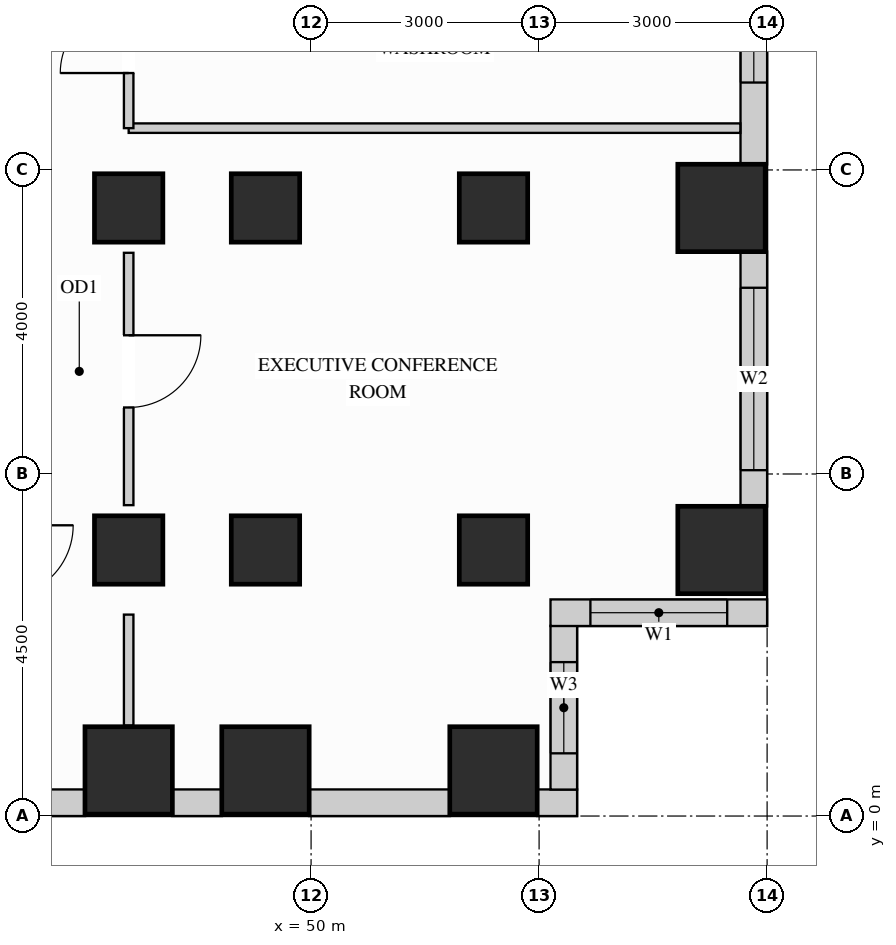
"""IFC4 building model, lengths in metres.
Left out: names, types, materials, properties, quantities, classifications, styles, units other than length and angle.
Written with IfcOpenShell. Run it as: python <this file> out.ifc"""

import sys

from ifc_helpers import new_model, si_unit, direction, frame, frame_2d, origin, origin_2d, place, context, subcontext, project, spatial, rectangle, extrude, source, transform, mapped, element, fill, save


model = new_model("IFC4")
c1 = context("Model", 3, precision=1e-05, world=origin(), true_north=direction((0.0, 1.0)))
c2 = subcontext(c1, "Body", "Model", "MODEL_VIEW")
j1 = project(units=[si_unit("LENGTHUNIT", "METRE"), si_unit("PLANEANGLEUNIT", "RADIAN")], contexts=[c1])
p1 = place(None, origin())
s1 = spatial("IfcSite", under=j1, at=p1, CompositionType="ELEMENT")
p2 = place(p1, origin())
s2 = spatial("IfcBuilding", under=s1, at=p2, CompositionType="ELEMENT")
p3 = place(p2, frame((0.0, 0.0, 124.2)))
s3 = spatial("IfcBuildingStorey", under=s2, at=p3, CompositionType="ELEMENT", Elevation=124.2)
m1 = source(origin(), c2, "Body", "SweptSolid", [
    extrude(rectangle(XDim=0.9, YDim=0.9, at=origin_2d()), origin(), (0.0, 0.0, 1.0), 3.38),
])
for number, where, z_axis, x_axis in (
    (1, (47.6, 3.5, 0.0), (0.0, 0.0, 1.0), (1.0, 0.0, 0.0)),
    (2, (47.6, 8.0, 0.0), (0.0, 0.0, 1.0), (1.0, 0.0, 0.0)),
    (3, (49.4, 3.5, 0.0), (0.0, 0.0, 1.0), (1.0, 0.0, 0.0)),
    (4, (49.4, 8.0, 0.0), (0.0, 0.0, 1.0), (1.0, 0.0, 0.0)),
    (5, (52.4, 3.5, 0.0), (0.0, 0.0, 1.0), (1.0, 0.0, 0.0)),
    (6, (52.4, 8.0, 0.0), (0.0, 0.0, 1.0), (1.0, 0.0, 0.0)),
):
    element("IfcColumn", number, at=place(p3, frame(where, z_axis=z_axis, x_axis=x_axis)), inside=s3, PredefinedType="COLUMN", context=c2, shape_type="MappedRepresentation", body=[
        mapped(m1, transform((0.0, 0.0, 0.0), x_axis=(1.0, 0.0, 0.0), y_axis=(0.0, 1.0, 0.0), z_axis=(0.0, 0.0, 1.0))),
    ])
m2 = source(origin(), c2, "Body", "SweptSolid", [
    extrude(rectangle(XDim=1.15, YDim=1.15, at=origin_2d()), origin(), (0.0, 0.0, 1.0), 3.38),
])
for number, where, z_axis, x_axis in (
    (7, (55.4, 3.5, 0.0), (0.0, 0.0, 1.0), (1.0, 0.0, 0.0)),
    (8, (55.4, 8.0, 0.0), (0.0, 0.0, 1.0), (1.0, 0.0, 0.0)),
    (9, (47.6, 0.6, 0.0), (0.0, 0.0, 1.0), (1.0, 0.0, 0.0)),
    (10, (49.4, 0.6, 0.0), (0.0, 0.0, 1.0), (1.0, 0.0, 0.0)),
    (11, (52.4, 0.6, 0.0), (0.0, 0.0, 1.0), (1.0, 0.0, 0.0)),
):
    element("IfcColumn", number, at=place(p3, frame(where, z_axis=z_axis, x_axis=x_axis)), inside=s3, PredefinedType="COLUMN", context=c2, shape_type="MappedRepresentation", body=[
        mapped(m2, transform((0.0, 0.0, 0.0), x_axis=(1.0, 0.0, 0.0), y_axis=(0.0, 1.0, 0.0), z_axis=(0.0, 0.0, 1.0))),
    ])
p4 = place(p3, frame((40.573, 0.175, 0.0), z_axis=(0.0, 0.0, 1.0), x_axis=(1.0, 0.0, 0.0)))
e12 = element("IfcWall", 12, at=p4, inside=s3, PredefinedType="SOLIDWALL", context=c2, shape_type="SweptSolid", body=[
    extrude(rectangle(XDim=6.454, YDim=0.35, at=frame_2d((3.227, 0.0))), origin(), (0.0, 0.0, 1.0), 3.365),
])
p5 = place(p4, frame((0.712, 0.0, 0.78)))
e13 = element("IfcOpeningElement", 13, at=p5, cuts=e12, PredefinedType="OPENING", context=c2, shape_type="SweptSolid", body=[
    extrude(rectangle(XDim=1.8, YDim=2.1, at=frame_2d((0.9, 1.05))), frame((0.0, 0.185, 0.0), z_axis=(0.0, -1.0, 0.0), x_axis=(1.0, 0.0, 0.0)), (0.0, 0.0, 1.0), 0.37),
])
p6 = place(p4, frame((2.905, 0.0, 0.78)))
e14 = element("IfcOpeningElement", 14, at=p6, cuts=e12, PredefinedType="OPENING", context=c2, shape_type="SweptSolid", body=[
    extrude(rectangle(XDim=1.8, YDim=2.1, at=frame_2d((0.9, 1.05))), frame((0.0, 0.185, 0.0), z_axis=(0.0, -1.0, 0.0), x_axis=(1.0, 0.0, 0.0)), (0.0, 0.0, 1.0), 0.37),
])
m3 = source(origin(), c2, "Body", "SweptSolid", [
    extrude(rectangle(XDim=0.654, YDim=0.35, at=frame_2d((0.327, 0.0))), origin(), (0.0, 0.0, 1.0), 3.365),
])
p7 = place(p3, frame((48.173, 0.175, 0.0), z_axis=(0.0, 0.0, 1.0), x_axis=(1.0, 0.0, 0.0)))
e15 = element("IfcWall", 15, at=p7, inside=s3, PredefinedType="SOLIDWALL", context=c2, shape_type="MappedRepresentation", body=[
    mapped(m3, transform((0.0, 0.0, 0.0), x_axis=(1.0, 0.0, 0.0), y_axis=(0.0, 1.0, 0.0), z_axis=(0.0, 0.0, 1.0))),
])
m4 = source(origin(), c2, "Body", "SweptSolid", [
    extrude(rectangle(XDim=1.854, YDim=0.35, at=frame_2d((0.927, 0.0))), origin(), (0.0, 0.0, 1.0), 3.365),
])
p8 = place(p3, frame((49.973, 0.175, 0.0), z_axis=(0.0, 0.0, 1.0), x_axis=(1.0, 0.0, 0.0)))
e16 = element("IfcWall", 16, at=p8, inside=s3, PredefinedType="SOLIDWALL", context=c2, shape_type="MappedRepresentation", body=[
    mapped(m4, transform((0.0, 0.0, 0.0), x_axis=(1.0, 0.0, 0.0), y_axis=(0.0, 1.0, 0.0), z_axis=(0.0, 0.0, 1.0))),
])
m5 = source(origin(), c2, "Body", "SweptSolid", [
    extrude(rectangle(XDim=0.527, YDim=0.35, at=frame_2d((0.264, 0.0))), origin(), (0.0, 0.0, 1.0), 3.365),
])
p9 = place(p3, frame((52.973, 0.175, 0.0), z_axis=(0.0, 0.0, 1.0), x_axis=(1.0, 0.0, 0.0)))
e17 = element("IfcWall", 17, at=p9, inside=s3, PredefinedType="SOLIDWALL", context=c2, shape_type="MappedRepresentation", body=[
    mapped(m5, transform((0.0, 0.0, 0.0), x_axis=(1.0, 0.0, 0.0), y_axis=(0.0, 1.0, 0.0), z_axis=(0.0, 0.0, 1.0))),
])
p10 = place(p3, frame((53.325, 0.348, 0.0), z_axis=(0.0, 0.0, 1.0), x_axis=(0.0, 1.0, 0.0)))
e18 = element("IfcWall", 18, at=p10, inside=s3, PredefinedType="SOLIDWALL", context=c2, shape_type="SweptSolid", body=[
    extrude(rectangle(XDim=2.154, YDim=0.35, at=frame_2d((1.077, 0.0))), origin(), (0.0, 0.0, 1.0), 3.365),
])
p11 = place(p10, frame((0.477, 0.0, 0.78)))
e19 = element("IfcOpeningElement", 19, at=p11, cuts=e18, PredefinedType="OPENING", context=c2, shape_type="SweptSolid", body=[
    extrude(rectangle(XDim=1.2, YDim=2.1, at=frame_2d((0.6, 1.05))), frame((0.0, 0.185, 0.0), z_axis=(0.0, -1.0, 0.0), x_axis=(1.0, 0.0, 0.0)), (0.0, 0.0, 1.0), 0.37),
])
p12 = place(p3, frame((53.15, 2.675, 0.0), z_axis=(0.0, 0.0, 1.0), x_axis=(1.0, 0.0, 0.0)))
e20 = element("IfcWall", 20, at=p12, inside=s3, PredefinedType="SOLIDWALL", context=c2, shape_type="SweptSolid", body=[
    extrude(rectangle(XDim=2.85, YDim=0.35, at=frame_2d((1.425, 0.0))), origin(), (0.0, 0.0, 1.0), 3.365),
])
p13 = place(p12, frame((0.525, 0.0, 0.78)))
e21 = element("IfcOpeningElement", 21, at=p13, cuts=e20, PredefinedType="OPENING", context=c2, shape_type="SweptSolid", body=[
    extrude(rectangle(XDim=1.8, YDim=2.1, at=frame_2d((0.9, 1.05))), frame((0.0, 0.185, 0.0), z_axis=(0.0, -1.0, 0.0), x_axis=(1.0, 0.0, 0.0)), (0.0, 0.0, 1.0), 0.37),
])
p14 = place(p3, frame((55.825, 4.073, 0.0), z_axis=(0.0, 0.0, 1.0), x_axis=(0.0, 1.0, 0.0)))
e22 = element("IfcWall", 22, at=p14, inside=s3, PredefinedType="SOLIDWALL", context=c2, shape_type="SweptSolid", body=[
    extrude(rectangle(XDim=3.354, YDim=0.35, at=frame_2d((1.677, 0.0))), origin(), (0.0, 0.0, 1.0), 3.365),
])
p15 = place(p14, frame((0.477, 0.0, 0.78)))
e23 = element("IfcOpeningElement", 23, at=p15, cuts=e22, PredefinedType="OPENING", context=c2, shape_type="SweptSolid", body=[
    extrude(rectangle(XDim=2.4, YDim=2.1, at=frame_2d((1.2, 1.05))), frame((0.0, 0.185, 0.0), z_axis=(0.0, -1.0, 0.0), x_axis=(1.0, 0.0, 0.0)), (0.0, 0.0, 1.0), 0.37),
])
p16 = place(p3, frame((55.825, 8.573, 0.0), z_axis=(0.0, 0.0, 1.0), x_axis=(0.0, 1.0, 0.0)))
e24 = element("IfcWall", 24, at=p16, inside=s3, PredefinedType="SOLIDWALL", context=c2, shape_type="SweptSolid", body=[
    extrude(rectangle(XDim=4.354, YDim=0.35, at=frame_2d((2.177, 0.0))), origin(), (0.0, 0.0, 1.0), 3.365),
])
p17 = place(p16, frame((1.077, 0.0, 0.78)))
e25 = element("IfcOpeningElement", 25, at=p17, cuts=e24, PredefinedType="OPENING", context=c2, shape_type="SweptSolid", body=[
    extrude(rectangle(XDim=1.2, YDim=2.1, at=frame_2d((0.6, 1.05))), frame((0.0, 0.185, 0.0), z_axis=(0.0, -1.0, 0.0), x_axis=(1.0, 0.0, 0.0)), (0.0, 0.0, 1.0), 0.37),
])
m6 = source(origin(), c2, "Body", "SweptSolid", [
    extrude(rectangle(XDim=8.048, YDim=0.125, at=frame_2d((4.024, 0.0))), origin(), (0.0, 0.0, 1.0), 3.365),
])
p18 = place(p3, frame((47.6, 9.05, 0.0), z_axis=(0.0, 0.0, 1.0), x_axis=(1.0, 0.0, 0.0)))
e26 = element("IfcWall", 26, at=p18, inside=s3, PredefinedType="PARTITIONING", context=c2, shape_type="MappedRepresentation", body=[
    mapped(m6, transform((0.0, 0.0, 0.0), x_axis=(1.0, 0.0, 0.0), y_axis=(0.0, 1.0, 0.0), z_axis=(0.0, 0.0, 1.0))),
])
p19 = place(p3, frame((47.6, 4.09, 0.0), z_axis=(0.0, 0.0, 1.0), x_axis=(0.0, 1.0, 0.0)))
e27 = element("IfcWall", 27, at=p19, inside=s3, PredefinedType="PARTITIONING", context=c2, shape_type="SweptSolid", body=[
    extrude(rectangle(XDim=3.32, YDim=0.125, at=frame_2d((1.66, 0.0))), origin(), (0.0, 0.0, 1.0), 2.677),
])
p20 = place(p19, frame((1.285, 0.0, 0.0)))
e28 = element("IfcOpeningElement", 28, at=p20, cuts=e27, PredefinedType="OPENING", context=c2, shape_type="SweptSolid", body=[
    extrude(rectangle(XDim=0.95, YDim=2.15, at=frame_2d((0.475, 1.075))), frame((0.0, 0.073, 0.0), z_axis=(0.0, -1.0, 0.0), x_axis=(1.0, 0.0, 0.0)), (0.0, 0.0, 1.0), 0.145),
])
m7 = source(origin(), c2, "Body", "SweptSolid", [
    extrude(rectangle(XDim=1.46, YDim=0.125, at=frame_2d((0.73, 0.0))), origin(), (0.0, 0.0, 1.0), 2.677),
])
p21 = place(p3, frame((47.6, 1.19, 0.0), z_axis=(0.0, 0.0, 1.0), x_axis=(0.0, 1.0, 0.0)))
e29 = element("IfcWall", 29, at=p21, inside=s3, PredefinedType="PARTITIONING", context=c2, shape_type="MappedRepresentation", body=[
    mapped(m7, transform((0.0, 0.0, 0.0), x_axis=(1.0, 0.0, 0.0), y_axis=(0.0, 1.0, 0.0), z_axis=(0.0, 0.0, 1.0))),
])
p22 = place(p3, frame((47.6, 9.05, 0.0), z_axis=(0.0, 0.0, 1.0), x_axis=(0.0, 1.0, 0.0)))
e30 = element("IfcWall", 30, at=p22, inside=s3, PredefinedType="PARTITIONING", context=c2, shape_type="SweptSolid", body=[
    extrude(rectangle(XDim=2.4, YDim=0.125, at=frame_2d((1.2, 0.0))), origin(), (0.0, 0.0, 1.0), 2.677),
])
p23 = place(p22, frame((0.725, 0.0, 0.0)))
e31 = element("IfcOpeningElement", 31, at=p23, cuts=e30, PredefinedType="OPENING", context=c2, shape_type="SweptSolid", body=[
    extrude(rectangle(XDim=0.9, YDim=2.15, at=frame_2d((0.45, 1.075))), frame((0.0, 0.073, 0.0), z_axis=(0.0, -1.0, 0.0), x_axis=(1.0, 0.0, 0.0)), (0.0, 0.0, 1.0), 0.145),
])
m8 = source(origin(), c2, "Body", "SweptSolid", [
    extrude(rectangle(XDim=0.95, YDim=2.15, at=frame_2d((0.475, 1.075))), frame((0.0, 0.025, 0.0), z_axis=(0.0, -1.0, 0.0), x_axis=(1.0, 0.0, 0.0)), (0.0, 0.0, 1.0), 0.05),
])
p24 = place(p20, origin())
e32 = element("IfcDoor", 32, at=p24, inside=s3, OperationType="SINGLE_SWING_RIGHT", PredefinedType="DOOR", context=c2, shape_type="MappedRepresentation", body=[
    mapped(m8, transform((0.0, 0.0, 0.0), x_axis=(1.0, 0.0, 0.0), y_axis=(0.0, 1.0, 0.0), z_axis=(0.0, 0.0, 1.0))),
])
fill(e28, e32)
m9 = source(origin(), c2, "Body", "SweptSolid", [
    extrude(rectangle(XDim=0.9, YDim=2.15, at=frame_2d((0.45, 1.075))), frame((0.0, 0.025, 0.0), z_axis=(0.0, -1.0, 0.0), x_axis=(1.0, 0.0, 0.0)), (0.0, 0.0, 1.0), 0.05),
])
p25 = place(p23, origin())
e33 = element("IfcDoor", 33, at=p25, inside=s3, OperationType="SINGLE_SWING_LEFT", PredefinedType="DOOR", context=c2, shape_type="MappedRepresentation", body=[
    mapped(m9, transform((0.0, 0.0, 0.0), x_axis=(1.0, 0.0, 0.0), y_axis=(0.0, 1.0, 0.0), z_axis=(0.0, 0.0, 1.0))),
])
fill(e31, e33)
m10 = source(origin(), c2, "Body", "SweptSolid", [
    extrude(rectangle(XDim=1.8, YDim=2.1, at=frame_2d((0.9, 1.05))), frame((0.0, 0.03, 0.0), z_axis=(0.0, -1.0, 0.0), x_axis=(1.0, 0.0, 0.0)), (0.0, 0.0, 1.0), 0.06),
])
p26 = place(p13, origin())
e34 = element("IfcWindow", 34, at=p26, inside=s3, PartitioningType="SINGLE_PANEL", PredefinedType="WINDOW", context=c2, shape_type="MappedRepresentation", body=[
    mapped(m10, transform((0.0, 0.0, 0.0), x_axis=(1.0, 0.0, 0.0), y_axis=(0.0, 1.0, 0.0), z_axis=(0.0, 0.0, 1.0))),
])
fill(e21, e34)
m11 = source(origin(), c2, "Body", "SweptSolid", [
    extrude(rectangle(XDim=2.4, YDim=2.1, at=frame_2d((1.2, 1.05))), frame((0.0, 0.03, 0.0), z_axis=(0.0, -1.0, 0.0), x_axis=(1.0, 0.0, 0.0)), (0.0, 0.0, 1.0), 0.06),
])
p27 = place(p15, origin())
e35 = element("IfcWindow", 35, at=p27, inside=s3, PartitioningType="SINGLE_PANEL", PredefinedType="WINDOW", context=c2, shape_type="MappedRepresentation", body=[
    mapped(m11, transform((0.0, 0.0, 0.0), x_axis=(1.0, 0.0, 0.0), y_axis=(0.0, 1.0, 0.0), z_axis=(0.0, 0.0, 1.0))),
])
fill(e23, e35)
m12 = source(origin(), c2, "Body", "SweptSolid", [
    extrude(rectangle(XDim=1.2, YDim=2.1, at=frame_2d((0.6, 1.05))), frame((0.0, 0.03, 0.0), z_axis=(0.0, -1.0, 0.0), x_axis=(1.0, 0.0, 0.0)), (0.0, 0.0, 1.0), 0.06),
])
p28 = place(p11, origin())
e36 = element("IfcWindow", 36, at=p28, inside=s3, PartitioningType="SINGLE_PANEL", PredefinedType="WINDOW", context=c2, shape_type="MappedRepresentation", body=[
    mapped(m12, transform((0.0, 0.0, 0.0), x_axis=(1.0, 0.0, 0.0), y_axis=(0.0, 1.0, 0.0), z_axis=(0.0, 0.0, 1.0))),
])
fill(e19, e36)
p29 = place(p17, origin())
e37 = element("IfcWindow", 37, at=p29, inside=s3, PartitioningType="SINGLE_PANEL", PredefinedType="WINDOW", context=c2, shape_type="MappedRepresentation", body=[
    mapped(m12, transform((0.0, 0.0, 0.0), x_axis=(1.0, 0.0, 0.0), y_axis=(0.0, 1.0, 0.0), z_axis=(0.0, 0.0, 1.0))),
])
fill(e25, e37)
save(model, sys.argv[1])
